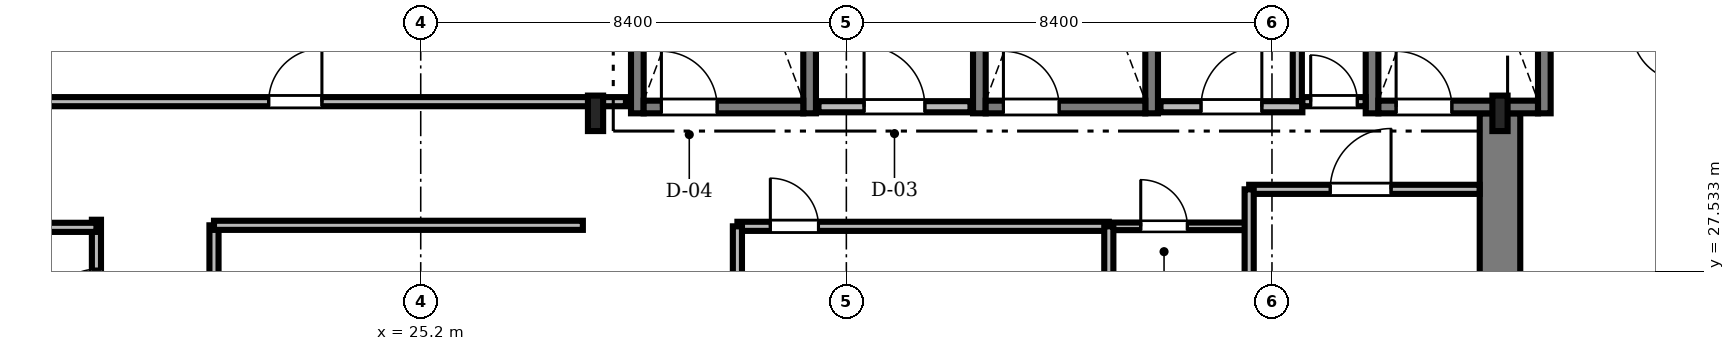
"""IFC4 building model, lengths in metres.
Left out: names, types, materials, properties, quantities, classifications, styles, units other than length and angle.
Written with IfcOpenShell. Run it as: python <this file> out.ifc"""

import sys

from ifc_helpers import new_model, si_unit, direction, frame, frame_2d, origin, origin_2d, place, context, subcontext, project, spatial, rectangle, i_section, extrude, source, transform, mapped, element, fill, save


model = new_model("IFC4")
c1 = context("Model", 3, precision=1e-05, world=origin(), true_north=direction((0.0, 1.0)))
c2 = subcontext(c1, "Body", "Model", "MODEL_VIEW")
j1 = project(units=[si_unit("LENGTHUNIT", "METRE"), si_unit("PLANEANGLEUNIT", "RADIAN")], contexts=[c1])
p1 = place(None, origin())
s1 = spatial("IfcSite", under=j1, at=p1, CompositionType="ELEMENT")
p2 = place(p1, origin())
s2 = spatial("IfcBuilding", under=s1, at=p2, CompositionType="ELEMENT")
p3 = place(p2, frame((0.0, 0.0, 211.05)))
s3 = spatial("IfcBuildingStorey", under=s2, at=p3, CompositionType="ELEMENT", Elevation=211.05)
m1 = source(origin(), c2, "Body", "SweptSolid", [
    extrude(rectangle(XDim=13.15, YDim=0.8, at=frame_2d((6.575, 0.0))), origin(), (0.0, 0.0, 1.0), 3.53),
])
p4 = place(p3, frame((46.5, 17.5, 0.0), z_axis=(0.0, 0.0, 1.0), x_axis=(0.0, 1.0, 0.0)))
e1 = element("IfcWall", 1, at=p4, inside=s3, PredefinedType="SHEAR", context=c2, shape_type="MappedRepresentation", body=[
    mapped(m1, transform((0.0, 0.0, 0.0), scale=1.0)),
])
m2 = source(origin(), c2, "Body", "SweptSolid", [
    extrude(i_section(OverallWidth=0.3, OverallDepth=0.7, WebThickness=0.017, FlangeThickness=0.032, FilletRadius=0.027, at=origin_2d()), origin(), (0.0, 0.0, 1.0), 3.53),
])
for number, where, z_axis, x_axis in (
    (2, (28.65, 30.65, 0.0), (0.0, 0.0, 1.0), (1.0, 0.0, 0.0)),
    (3, (46.5, 30.65, 0.0), (0.0, 0.0, 1.0), (1.0, 0.0, 0.0)),
):
    element("IfcColumn", number, at=place(p3, frame(where, z_axis=z_axis, x_axis=x_axis)), inside=s3, PredefinedType="COLUMN", context=c2, shape_type="MappedRepresentation", body=[
        mapped(m2, transform((0.0, 0.0, 0.0), scale=1.0)),
    ])
m3 = source(origin(), c2, "Body", "SweptSolid", [
    extrude(rectangle(XDim=9.25, YDim=0.25, at=frame_2d((4.625, 0.0))), origin(), (0.0, 0.0, 1.0), 3.55),
])
for number, where, z_axis, x_axis in (
    (4, (29.475, 30.65, 0.0), (0.0, 0.0, 1.0), (0.0, 1.0, 0.0)),
    (5, (32.875, 30.65, 0.0), (0.0, 0.0, 1.0), (0.0, 1.0, 0.0)),
):
    element("IfcWall", number, at=place(p3, frame(where, z_axis=z_axis, x_axis=x_axis)), inside=s3, PredefinedType="SOLIDWALL", context=c2, shape_type="MappedRepresentation", body=[
        mapped(m3, transform((0.0, 0.0, 0.0), scale=1.0)),
    ])
m4 = source(origin(), c2, "Body", "SweptSolid", [
    extrude(rectangle(XDim=3.15, YDim=0.25, at=frame_2d((1.575, 0.0))), origin(), (0.0, 0.0, 1.0), 3.55),
])
p5 = place(p3, frame((29.6, 30.775, 0.0), z_axis=(0.0, 0.0, 1.0), x_axis=(1.0, 0.0, 0.0)))
e6 = element("IfcWall", 6, at=p5, inside=s3, PredefinedType="SOLIDWALL", context=c2, shape_type="MappedRepresentation", body=[
    mapped(m4, transform((0.0, 0.0, 0.0), scale=1.0)),
])
m5 = source(origin(), c2, "Body", "SweptSolid", [
    extrude(rectangle(XDim=1.1, YDim=2.2, at=frame_2d((0.55, 1.1))), frame((0.0, 0.135, 0.0), z_axis=(0.0, -1.0, 0.0), x_axis=(1.0, 0.0, 0.0)), (0.0, 0.0, 1.0), 0.27),
])
p6 = place(p5, frame((0.35, 0.0, 0.0)))
e7 = element("IfcOpeningElement", 7, at=p6, cuts=e6, PredefinedType="OPENING", context=c2, shape_type="MappedRepresentation", body=[
    mapped(m5, transform((0.0, 0.0, 0.0), scale=1.0)),
])
for number, where, z_axis, x_axis in (
    (8, (36.225, 30.65, 0.0), (0.0, 0.0, 1.0), (0.0, 1.0, 0.0)),
    (9, (39.625, 30.65, 0.0), (0.0, 0.0, 1.0), (0.0, 1.0, 0.0)),
):
    element("IfcWall", number, at=place(p3, frame(where, z_axis=z_axis, x_axis=x_axis)), inside=s3, PredefinedType="SOLIDWALL", context=c2, shape_type="MappedRepresentation", body=[
        mapped(m3, transform((0.0, 0.0, 0.0), scale=1.0)),
    ])
p7 = place(p3, frame((36.35, 30.775, 0.0), z_axis=(0.0, 0.0, 1.0), x_axis=(1.0, 0.0, 0.0)))
e10 = element("IfcWall", 10, at=p7, inside=s3, PredefinedType="SOLIDWALL", context=c2, shape_type="MappedRepresentation", body=[
    mapped(m4, transform((0.0, 0.0, 0.0), scale=1.0)),
])
p8 = place(p7, frame((0.35, 0.0, 0.0)))
e11 = element("IfcOpeningElement", 11, at=p8, cuts=e10, PredefinedType="OPENING", context=c2, shape_type="MappedRepresentation", body=[
    mapped(m5, transform((0.0, 0.0, 0.0), scale=1.0)),
])
for number, where, z_axis, x_axis in (
    (12, (43.975, 30.65, 0.0), (0.0, 0.0, 1.0), (0.0, 1.0, 0.0)),
    (13, (47.375, 30.65, 0.0), (0.0, 0.0, 1.0), (0.0, 1.0, 0.0)),
):
    element("IfcWall", number, at=place(p3, frame(where, z_axis=z_axis, x_axis=x_axis)), inside=s3, PredefinedType="SOLIDWALL", context=c2, shape_type="MappedRepresentation", body=[
        mapped(m3, transform((0.0, 0.0, 0.0), scale=1.0)),
    ])
p9 = place(p3, frame((44.1, 30.775, 0.0), z_axis=(0.0, 0.0, 1.0), x_axis=(1.0, 0.0, 0.0)))
e14 = element("IfcWall", 14, at=p9, inside=s3, PredefinedType="SOLIDWALL", context=c2, shape_type="MappedRepresentation", body=[
    mapped(m4, transform((0.0, 0.0, 0.0), scale=1.0)),
])
p10 = place(p9, frame((0.35, 0.0, 0.0)))
e15 = element("IfcOpeningElement", 15, at=p10, cuts=e14, PredefinedType="OPENING", context=c2, shape_type="MappedRepresentation", body=[
    mapped(m5, transform((0.0, 0.0, 0.0), scale=1.0)),
])
m6 = source(origin(), c2, "Body", "SweptSolid", [
    extrude(rectangle(XDim=3.0, YDim=0.22, at=frame_2d((1.5, 0.0))), origin(), (0.0, 0.0, 1.0), 3.53),
])
p11 = place(p3, frame((33.05, 30.78, 0.0), z_axis=(0.0, 0.0, 1.0), x_axis=(1.0, 0.0, 0.0)))
e16 = element("IfcWall", 16, at=p11, inside=s3, PredefinedType="SOLIDWALL", context=c2, shape_type="MappedRepresentation", body=[
    mapped(m6, transform((0.0, 0.0, 0.0), scale=1.0)),
])
m7 = source(origin(), c2, "Body", "SweptSolid", [
    extrude(rectangle(XDim=1.2, YDim=2.2, at=frame_2d((0.6, 1.1))), frame((0.0, 0.12, 0.0), z_axis=(0.0, -1.0, 0.0), x_axis=(1.0, 0.0, 0.0)), (0.0, 0.0, 1.0), 0.24),
])
p12 = place(p11, frame((0.9, 0.0, 0.0)))
e17 = element("IfcOpeningElement", 17, at=p12, cuts=e16, PredefinedType="OPENING", context=c2, shape_type="MappedRepresentation", body=[
    mapped(m7, transform((0.0, 0.0, 0.0), scale=1.0)),
])
m8 = source(origin(), c2, "Body", "SweptSolid", [
    extrude(rectangle(XDim=2.8, YDim=0.22, at=frame_2d((1.4, 0.0))), origin(), (0.0, 0.0, 1.0), 3.53),
])
p13 = place(p3, frame((39.8, 30.78, 0.0), z_axis=(0.0, 0.0, 1.0), x_axis=(1.0, 0.0, 0.0)))
e18 = element("IfcWall", 18, at=p13, inside=s3, PredefinedType="SOLIDWALL", context=c2, shape_type="MappedRepresentation", body=[
    mapped(m8, transform((0.0, 0.0, 0.0), scale=1.0)),
])
p14 = place(p13, frame((0.8, 0.0, 0.0)))
e19 = element("IfcOpeningElement", 19, at=p14, cuts=e18, PredefinedType="OPENING", context=c2, shape_type="MappedRepresentation", body=[
    mapped(m7, transform((0.0, 0.0, 0.0), scale=1.0)),
])
m9 = source(origin(), c2, "Body", "SweptSolid", [
    extrude(rectangle(XDim=17.828, YDim=0.18, at=frame_2d((8.914, 0.0))), origin(), (0.0, 0.0, 1.0), 2.772),
])
p15 = place(p3, frame((11.422, 30.88, 0.0), z_axis=(0.0, 0.0, 1.0), x_axis=(1.0, 0.0, 0.0)))
e20 = element("IfcWall", 20, at=p15, inside=s3, PredefinedType="PARTITIONING", context=c2, shape_type="MappedRepresentation", body=[
    mapped(m9, transform((0.0, 0.0, 0.0), scale=1.0)),
])
m10 = source(origin(), c2, "Body", "SweptSolid", [
    extrude(rectangle(XDim=1.05, YDim=2.2, at=frame_2d((0.525, 1.1))), frame((0.0, 0.1, 0.0), z_axis=(0.0, -1.0, 0.0), x_axis=(1.0, 0.0, 0.0)), (0.0, 0.0, 1.0), 0.2),
])
p16 = place(p15, frame((10.778, 0.0, 0.0)))
e21 = element("IfcOpeningElement", 21, at=p16, cuts=e20, PredefinedType="OPENING", context=c2, shape_type="MappedRepresentation", body=[
    mapped(m10, transform((0.0, 0.0, 0.0), scale=1.0)),
])
m11 = source(origin(), c2, "Body", "SweptSolid", [
    extrude(rectangle(XDim=15.04, YDim=0.18, at=frame_2d((7.52, 0.0))), origin(), (0.0, 0.0, 1.0), 2.972),
])
p17 = place(p3, frame((18.8, 13.51, 0.0), z_axis=(0.0, 0.0, 1.0), x_axis=(0.0, 1.0, 0.0)))
e22 = element("IfcWall", 22, at=p17, inside=s3, PredefinedType="PARTITIONING", context=c2, shape_type="MappedRepresentation", body=[
    mapped(m11, transform((0.0, 0.0, 0.0), scale=1.0)),
])
p18 = place(p17, frame((1.962, 0.0, 0.0)))
e23 = element("IfcOpeningElement", 23, at=p18, cuts=e22, PredefinedType="OPENING", context=c2, shape_type="MappedRepresentation", body=[
    mapped(m10, transform((0.0, 0.0, 0.0), scale=1.0)),
])
m12 = source(origin(), c2, "Body", "SweptSolid", [
    extrude(rectangle(XDim=0.95, YDim=2.15, at=frame_2d((0.475, 1.075))), frame((0.0, 0.1, 0.0), z_axis=(0.0, -1.0, 0.0), x_axis=(1.0, 0.0, 0.0)), (0.0, 0.0, 1.0), 0.2),
])
p19 = place(p17, frame((8.15, 0.0, 0.0)))
e24 = element("IfcOpeningElement", 24, at=p19, cuts=e22, PredefinedType="OPENING", context=c2, shape_type="MappedRepresentation", body=[
    mapped(m12, transform((0.0, 0.0, 0.0), scale=1.0)),
])
p20 = place(p17, frame((13.113, 0.0, 0.0)))
e25 = element("IfcOpeningElement", 25, at=p20, cuts=e22, PredefinedType="OPENING", context=c2, shape_type="MappedRepresentation", body=[
    mapped(m12, transform((0.0, 0.0, 0.0), scale=1.0)),
])
m13 = source(origin(), c2, "Body", "SweptSolid", [
    extrude(rectangle(XDim=11.94, YDim=0.18, at=frame_2d((5.97, 0.0))), origin(), (0.0, 0.0, 1.0), 2.972),
])
p21 = place(p3, frame((21.12, 16.5, 0.0), z_axis=(0.0, 0.0, 1.0), x_axis=(0.0, 1.0, 0.0)))
e26 = element("IfcWall", 26, at=p21, inside=s3, PredefinedType="PARTITIONING", context=c2, shape_type="MappedRepresentation", body=[
    mapped(m13, transform((0.0, 0.0, 0.0), scale=1.0)),
])
p22 = place(p21, frame((4.5, 0.0, 0.0)))
e27 = element("IfcOpeningElement", 27, at=p22, cuts=e26, PredefinedType="OPENING", context=c2, shape_type="MappedRepresentation", body=[
    mapped(m10, transform((0.0, 0.0, 0.0), scale=1.0)),
])
m14 = source(origin(), c2, "Body", "SweptSolid", [
    extrude(rectangle(XDim=7.33, YDim=0.18, at=frame_2d((3.665, 0.0))), origin(), (0.0, 0.0, 1.0), 3.162),
])
p23 = place(p3, frame((31.45, 28.42, 0.0), z_axis=(0.0, 0.0, 1.0), x_axis=(1.0, 0.0, 0.0)))
e28 = element("IfcWall", 28, at=p23, inside=s3, PredefinedType="PARTITIONING", context=c2, shape_type="MappedRepresentation", body=[
    mapped(m14, transform((0.0, 0.0, 0.0), scale=1.0)),
])
p24 = place(p23, frame((0.65, 0.0, 0.0)))
e29 = element("IfcOpeningElement", 29, at=p24, cuts=e28, PredefinedType="OPENING", context=c2, shape_type="MappedRepresentation", body=[
    mapped(m12, transform((0.0, 0.0, 0.0), scale=1.0)),
])
m15 = source(origin(), c2, "Body", "SweptSolid", [
    extrude(rectangle(XDim=4.548, YDim=0.18, at=frame_2d((2.274, 0.0))), origin(), (0.0, 0.0, 1.0), 3.162),
])
p25 = place(p3, frame((41.55, 29.15, 0.0), z_axis=(0.0, 0.0, 1.0), x_axis=(1.0, 0.0, 0.0)))
e30 = element("IfcWall", 30, at=p25, inside=s3, PredefinedType="PARTITIONING", context=c2, shape_type="MappedRepresentation", body=[
    mapped(m15, transform((0.0, 0.0, 0.0), scale=1.0)),
])
m16 = source(origin(), c2, "Body", "SweptSolid", [
    extrude(rectangle(XDim=1.2, YDim=2.2, at=frame_2d((0.6, 1.1))), frame((0.0, 0.1, 0.0), z_axis=(0.0, -1.0, 0.0), x_axis=(1.0, 0.0, 0.0)), (0.0, 0.0, 1.0), 0.2),
])
p26 = place(p25, frame((1.6, 0.0, 0.0)))
e31 = element("IfcOpeningElement", 31, at=p26, cuts=e30, PredefinedType="OPENING", context=c2, shape_type="MappedRepresentation", body=[
    mapped(m16, transform((0.0, 0.0, 0.0), scale=1.0)),
])
m17 = source(origin(), c2, "Body", "SweptSolid", [
    extrude(rectangle(XDim=2.74, YDim=0.15, at=frame_2d((1.37, 0.0))), origin(), (0.0, 0.0, 1.0), 3.53),
])
p27 = place(p3, frame((38.78, 28.42, 0.0), z_axis=(0.0, 0.0, 1.0), x_axis=(1.0, 0.0, 0.0)))
e32 = element("IfcWall", 32, at=p27, inside=s3, PredefinedType="PARTITIONING", context=c2, shape_type="MappedRepresentation", body=[
    mapped(m17, transform((0.0, 0.0, 0.0), scale=1.0)),
])
m18 = source(origin(), c2, "Body", "SweptSolid", [
    extrude(rectangle(XDim=0.92, YDim=2.1, at=frame_2d((0.46, 1.05))), frame((0.0, 0.085, 0.0), z_axis=(0.0, -1.0, 0.0), x_axis=(1.0, 0.0, 0.0)), (0.0, 0.0, 1.0), 0.17),
])
p28 = place(p27, frame((0.63, 0.0, 0.0)))
e33 = element("IfcOpeningElement", 33, at=p28, cuts=e32, PredefinedType="OPENING", context=c2, shape_type="MappedRepresentation", body=[
    mapped(m18, transform((0.0, 0.0, 0.0), scale=1.0)),
])
m19 = source(origin(), c2, "Body", "SweptSolid", [
    extrude(rectangle(XDim=1.248, YDim=0.18, at=frame_2d((0.624, 0.0))), origin(), (0.0, 0.0, 1.0), 3.53),
])
p29 = place(p3, frame((42.6, 30.88, 0.0), z_axis=(0.0, 0.0, 1.0), x_axis=(1.0, 0.0, 0.0)))
e34 = element("IfcWall", 34, at=p29, inside=s3, PredefinedType="PARTITIONING", context=c2, shape_type="MappedRepresentation", body=[
    mapped(m19, transform((0.0, 0.0, 0.0), scale=1.0)),
])
m20 = source(origin(), c2, "Body", "SweptSolid", [
    extrude(rectangle(XDim=0.92, YDim=2.1, at=frame_2d((0.46, 1.05))), frame((0.0, 0.1, 0.0), z_axis=(0.0, -1.0, 0.0), x_axis=(1.0, 0.0, 0.0)), (0.0, 0.0, 1.0), 0.2),
])
p30 = place(p29, frame((0.164, 0.0, 0.0)))
e35 = element("IfcOpeningElement", 35, at=p30, cuts=e34, PredefinedType="OPENING", context=c2, shape_type="MappedRepresentation", body=[
    mapped(m20, transform((0.0, 0.0, 0.0), scale=1.0)),
])
m21 = source(origin(), c2, "Body", "SweptSolid", [
    extrude(rectangle(XDim=7.57, YDim=0.18, at=frame_2d((3.785, 0.0))), origin(), (0.0, 0.0, 1.0), 2.772),
])
p31 = place(p3, frame((11.23, 28.4, 0.0), z_axis=(0.0, 0.0, 1.0), x_axis=(1.0, 0.0, 0.0)))
e36 = element("IfcWall", 36, at=p31, inside=s3, PredefinedType="PARTITIONING", context=c2, shape_type="MappedRepresentation", body=[
    mapped(m21, transform((0.0, 0.0, 0.0), scale=1.0)),
])
m22 = source(origin(), c2, "Body", "SweptSolid", [
    extrude(rectangle(XDim=7.28, YDim=0.18, at=frame_2d((3.64, 0.0))), origin(), (0.0, 0.0, 1.0), 3.53),
])
p32 = place(p3, frame((21.12, 28.44, 0.0), z_axis=(0.0, 0.0, 1.0), x_axis=(1.0, 0.0, 0.0)))
e37 = element("IfcWall", 37, at=p32, inside=s3, PredefinedType="PARTITIONING", context=c2, shape_type="MappedRepresentation", body=[
    mapped(m22, transform((0.0, 0.0, 0.0), scale=1.0)),
])
m23 = source(origin(), c2, "Body", "SweptSolid", [
    extrude(rectangle(XDim=2.758, YDim=0.18, at=frame_2d((1.379, 0.0))), origin(), (0.0, 0.0, 1.0), 3.53),
])
p33 = place(p3, frame((42.5, 30.892, 0.0), z_axis=(0.0, 0.0, 1.0), x_axis=(0.0, 1.0, 0.0)))
e38 = element("IfcWall", 38, at=p33, inside=s3, PredefinedType="PARTITIONING", context=c2, shape_type="MappedRepresentation", body=[
    mapped(m23, transform((0.0, 0.0, 0.0), scale=1.0)),
])
m24 = source(origin(), c2, "Body", "SweptSolid", [
    extrude(rectangle(XDim=2.35, YDim=0.18, at=frame_2d((1.175, 0.0))), origin(), (0.0, 0.0, 1.0), 2.972),
])
p34 = place(p3, frame((41.55, 26.8, 0.0), z_axis=(0.0, 0.0, 1.0), x_axis=(0.0, 1.0, 0.0)))
e39 = element("IfcWall", 39, at=p34, inside=s3, PredefinedType="PARTITIONING", context=c2, shape_type="MappedRepresentation", body=[
    mapped(m24, transform((0.0, 0.0, 0.0), scale=1.0)),
])
m25 = source(origin(), c2, "Body", "SweptSolid", [
    extrude(rectangle(XDim=1.6, YDim=0.18, at=frame_2d((0.8, 0.0))), origin(), (0.0, 0.0, 1.0), 3.072),
])
for number, where, z_axis, x_axis in (
    (40, (31.45, 26.82, 0.0), (0.0, 0.0, 1.0), (0.0, 1.0, 0.0)),
    (41, (38.78, 26.82, 0.0), (0.0, 0.0, 1.0), (0.0, 1.0, 0.0)),
):
    element("IfcWall", number, at=place(p3, frame(where, z_axis=z_axis, x_axis=x_axis)), inside=s3, PredefinedType="PARTITIONING", context=c2, shape_type="MappedRepresentation", body=[
        mapped(m25, transform((0.0, 0.0, 0.0), scale=1.0)),
    ])
m26 = source(origin(), c2, "Body", "SweptSolid", [
    extrude(rectangle(XDim=1.1, YDim=2.2, at=frame_2d((0.55, 1.1))), frame((0.0, 0.025, 0.0), z_axis=(0.0, -1.0, 0.0), x_axis=(1.0, 0.0, 0.0)), (0.0, 0.0, 1.0), 0.05),
])
p35 = place(p6, origin())
e42 = element("IfcDoor", 42, at=p35, inside=s3, OperationType="SINGLE_SWING_LEFT", PredefinedType="DOOR", context=c2, shape_type="MappedRepresentation", body=[
    mapped(m26, transform((0.0, 0.0, 0.0), scale=1.0)),
])
fill(e7, e42)
p36 = place(p8, origin())
e43 = element("IfcDoor", 43, at=p36, inside=s3, OperationType="SINGLE_SWING_LEFT", PredefinedType="DOOR", context=c2, shape_type="MappedRepresentation", body=[
    mapped(m26, transform((0.0, 0.0, 0.0), scale=1.0)),
])
fill(e11, e43)
p37 = place(p10, origin())
e44 = element("IfcDoor", 44, at=p37, inside=s3, OperationType="SINGLE_SWING_LEFT", PredefinedType="DOOR", context=c2, shape_type="MappedRepresentation", body=[
    mapped(m26, transform((0.0, 0.0, 0.0), scale=1.0)),
])
fill(e15, e44)
m27 = source(origin(), c2, "Body", "SweptSolid", [
    extrude(rectangle(XDim=1.2, YDim=2.2, at=frame_2d((0.6, 1.1))), frame((0.0, 0.025, 0.0), z_axis=(0.0, -1.0, 0.0), x_axis=(1.0, 0.0, 0.0)), (0.0, 0.0, 1.0), 0.05),
])
p38 = place(p12, origin())
e45 = element("IfcDoor", 45, at=p38, inside=s3, OperationType="SINGLE_SWING_LEFT", PredefinedType="DOOR", context=c2, shape_type="MappedRepresentation", body=[
    mapped(m27, transform((0.0, 0.0, 0.0), scale=1.0)),
])
fill(e17, e45)
p39 = place(p14, origin())
e46 = element("IfcDoor", 46, at=p39, inside=s3, OperationType="SINGLE_SWING_RIGHT", PredefinedType="DOOR", context=c2, shape_type="MappedRepresentation", body=[
    mapped(m27, transform((0.0, 0.0, 0.0), scale=1.0)),
])
fill(e19, e46)
m28 = source(origin(), c2, "Body", "SweptSolid", [
    extrude(rectangle(XDim=1.05, YDim=2.2, at=frame_2d((0.525, 1.1))), frame((0.0, 0.025, 0.0), z_axis=(0.0, -1.0, 0.0), x_axis=(1.0, 0.0, 0.0)), (0.0, 0.0, 1.0), 0.05),
])
p40 = place(p16, origin())
e47 = element("IfcDoor", 47, at=p40, inside=s3, OperationType="SINGLE_SWING_RIGHT", PredefinedType="DOOR", context=c2, shape_type="MappedRepresentation", body=[
    mapped(m28, transform((0.0, 0.0, 0.0), scale=1.0)),
])
fill(e21, e47)
m29 = source(origin(), c2, "Body", "SweptSolid", [
    extrude(rectangle(XDim=0.95, YDim=2.15, at=frame_2d((0.475, 1.075))), frame((0.0, 0.025, 0.0), z_axis=(0.0, -1.0, 0.0), x_axis=(1.0, 0.0, 0.0)), (0.0, 0.0, 1.0), 0.05),
])
p41 = place(p20, origin())
e48 = element("IfcDoor", 48, at=p41, inside=s3, OperationType="SINGLE_SWING_LEFT", PredefinedType="DOOR", context=c2, shape_type="MappedRepresentation", body=[
    mapped(m29, transform((0.0, 0.0, 0.0), scale=1.0)),
])
fill(e25, e48)
p42 = place(p24, origin())
e49 = element("IfcDoor", 49, at=p42, inside=s3, OperationType="SINGLE_SWING_LEFT", PredefinedType="DOOR", context=c2, shape_type="MappedRepresentation", body=[
    mapped(m29, transform((0.0, 0.0, 0.0), scale=1.0)),
])
fill(e29, e49)
p43 = place(p26, origin())
e50 = element("IfcDoor", 50, at=p43, inside=s3, OperationType="SINGLE_SWING_RIGHT", PredefinedType="DOOR", context=c2, shape_type="MappedRepresentation", body=[
    mapped(m27, transform((0.0, 0.0, 0.0), scale=1.0)),
])
fill(e31, e50)
m30 = source(origin(), c2, "Body", "SweptSolid", [
    extrude(rectangle(XDim=0.92, YDim=2.1, at=frame_2d((0.46, 1.05))), frame((0.0, 0.025, 0.0), z_axis=(0.0, -1.0, 0.0), x_axis=(1.0, 0.0, 0.0)), (0.0, 0.0, 1.0), 0.05),
])
p44 = place(p28, origin())
e51 = element("IfcDoor", 51, at=p44, inside=s3, OperationType="SINGLE_SWING_LEFT", PredefinedType="DOOR", context=c2, shape_type="MappedRepresentation", body=[
    mapped(m30, transform((0.0, 0.0, 0.0), scale=1.0)),
])
fill(e33, e51)
p45 = place(p30, origin())
e52 = element("IfcDoor", 52, at=p45, inside=s3, OperationType="SINGLE_SWING_LEFT", PredefinedType="DOOR", context=c2, shape_type="MappedRepresentation", body=[
    mapped(m30, transform((0.0, 0.0, 0.0), scale=1.0)),
])
fill(e35, e52)
save(model, sys.argv[1])
